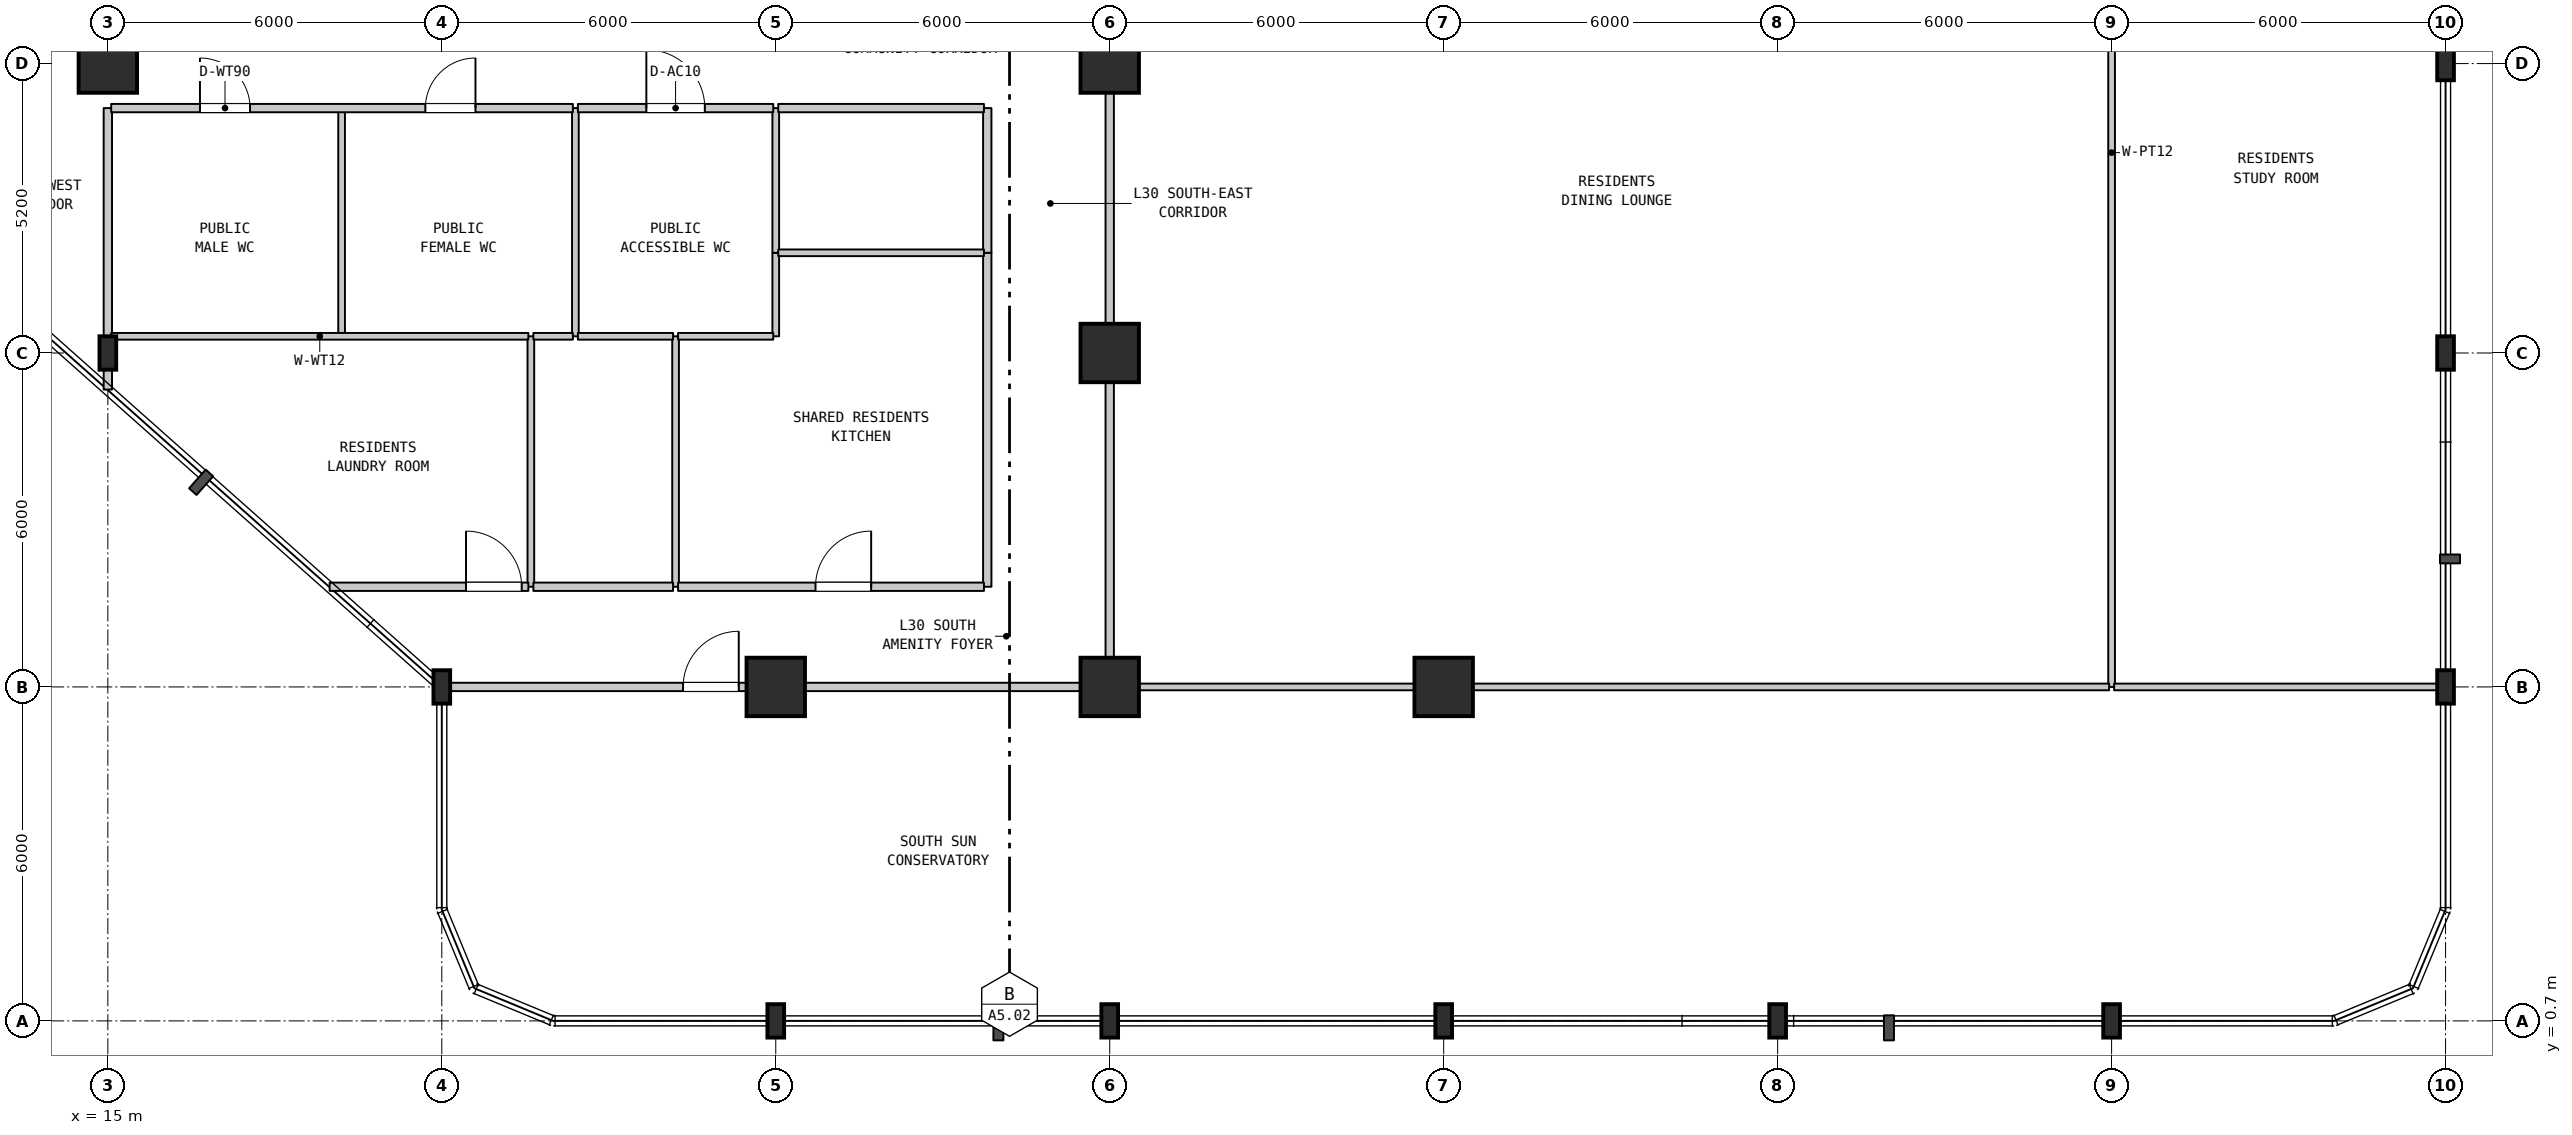
"""IFC4 building model, lengths in metres.
Left out: names, types, materials, properties, quantities, classifications, styles, units other than length and angle.
Written with IfcOpenShell. Run it as: python <this file> out.ifc"""

import sys

from ifc_helpers import new_model, si_unit, direction, frame, frame_2d, origin, origin_2d, place, context, subcontext, project, spatial, rectangle, i_section, extrude, element, fill, save


model = new_model("IFC4")
c1 = context("Model", 3, precision=1e-05, world=origin(), true_north=direction((0.0, 1.0)))
c2 = subcontext(c1, "Body", "Model", "MODEL_VIEW")
j1 = project(units=[si_unit("LENGTHUNIT", "METRE"), si_unit("PLANEANGLEUNIT", "RADIAN")], contexts=[c1])
p1 = place(None, origin())
s1 = spatial("IfcSite", under=j1, at=p1, CompositionType="ELEMENT")
p2 = place(p1, origin())
s2 = spatial("IfcBuilding", under=s1, at=p2, CompositionType="ELEMENT")
p3 = place(p2, frame((0.0, 0.0, 125.3)))
s3 = spatial("IfcBuildingStorey", under=s2, at=p3, CompositionType="ELEMENT", Elevation=125.3)
p4 = place(p3, frame((15.0, 12.7, 0.0), z_axis=(0.0, 0.0, 1.0), x_axis=(1.0, 0.0, 0.0)))
e1 = element("IfcColumn", 1, at=p4, inside=s3, PredefinedType="COLUMN", context=c2, shape_type="SweptSolid", body=[
    extrude(i_section(OverallWidth=0.3, OverallDepth=0.6, WebThickness=0.015, FlangeThickness=0.03, FilletRadius=0.027, at=origin_2d()), origin(), (0.0, 0.0, 1.0), 4.5),
])
p5 = place(p3, frame((15.0, 17.9, 0.0), z_axis=(0.0, 0.0, 1.0), x_axis=(1.0, 0.0, 0.0)))
e2 = element("IfcColumn", 2, at=p5, inside=s3, PredefinedType="COLUMN", context=c2, shape_type="SweptSolid", body=[
    extrude(rectangle(XDim=1.05, YDim=1.05, at=origin_2d()), origin(), (0.0, 0.0, 1.0), 4.5),
])
for number, where, z_axis, x_axis in (
    (3, (21.0, 6.7, 0.0), (0.0, 0.0, 1.0), (1.0, 0.0, 0.0)),
    (4, (27.0, 0.7, 0.0), (0.0, 0.0, 1.0), (1.0, 0.0, 0.0)),
):
    element("IfcColumn", number, at=place(p3, frame(where, z_axis=z_axis, x_axis=x_axis)), inside=s3, PredefinedType="COLUMN", context=c2, shape_type="SweptSolid", body=[
        extrude(i_section(OverallWidth=0.3, OverallDepth=0.6, WebThickness=0.015, FlangeThickness=0.03, FilletRadius=0.027, at=origin_2d()), origin(), (0.0, 0.0, 1.0), 4.5),
    ])
p6 = place(p3, frame((27.0, 6.7, 0.0), z_axis=(0.0, 0.0, 1.0), x_axis=(1.0, 0.0, 0.0)))
e5 = element("IfcColumn", 5, at=p6, inside=s3, PredefinedType="COLUMN", context=c2, shape_type="SweptSolid", body=[
    extrude(rectangle(XDim=1.05, YDim=1.05, at=origin_2d()), origin(), (0.0, 0.0, 1.0), 4.5),
])
p7 = place(p3, frame((33.0, 0.7, 0.0), z_axis=(0.0, 0.0, 1.0), x_axis=(1.0, 0.0, 0.0)))
e6 = element("IfcColumn", 6, at=p7, inside=s3, PredefinedType="COLUMN", context=c2, shape_type="SweptSolid", body=[
    extrude(i_section(OverallWidth=0.3, OverallDepth=0.6, WebThickness=0.015, FlangeThickness=0.03, FilletRadius=0.027, at=origin_2d()), origin(), (0.0, 0.0, 1.0), 4.5),
])
for number, where, z_axis, x_axis in (
    (7, (33.0, 6.7, 0.0), (0.0, 0.0, 1.0), (1.0, 0.0, 0.0)),
    (8, (33.0, 12.7, 0.0), (0.0, 0.0, 1.0), (1.0, 0.0, 0.0)),
    (9, (33.0, 17.9, 0.0), (0.0, 0.0, 1.0), (1.0, 0.0, 0.0)),
):
    element("IfcColumn", number, at=place(p3, frame(where, z_axis=z_axis, x_axis=x_axis)), inside=s3, PredefinedType="COLUMN", context=c2, shape_type="SweptSolid", body=[
        extrude(rectangle(XDim=1.05, YDim=1.05, at=origin_2d()), origin(), (0.0, 0.0, 1.0), 4.5),
    ])
p8 = place(p3, frame((39.0, 0.7, 0.0), z_axis=(0.0, 0.0, 1.0), x_axis=(1.0, 0.0, 0.0)))
e10 = element("IfcColumn", 10, at=p8, inside=s3, PredefinedType="COLUMN", context=c2, shape_type="SweptSolid", body=[
    extrude(i_section(OverallWidth=0.3, OverallDepth=0.6, WebThickness=0.015, FlangeThickness=0.03, FilletRadius=0.027, at=origin_2d()), origin(), (0.0, 0.0, 1.0), 4.5),
])
p9 = place(p3, frame((39.0, 6.7, 0.0), z_axis=(0.0, 0.0, 1.0), x_axis=(1.0, 0.0, 0.0)))
e11 = element("IfcColumn", 11, at=p9, inside=s3, PredefinedType="COLUMN", context=c2, shape_type="SweptSolid", body=[
    extrude(rectangle(XDim=1.05, YDim=1.05, at=origin_2d()), origin(), (0.0, 0.0, 1.0), 4.5),
])
for number, where, z_axis, x_axis in (
    (12, (45.0, 0.7, 0.0), (0.0, 0.0, 1.0), (1.0, 0.0, 0.0)),
    (13, (51.0, 0.7, 0.0), (0.0, 0.0, 1.0), (1.0, 0.0, 0.0)),
    (14, (57.0, 6.7, 0.0), (0.0, 0.0, 1.0), (1.0, 0.0, 0.0)),
    (15, (57.0, 12.7, 0.0), (0.0, 0.0, 1.0), (1.0, 0.0, 0.0)),
    (16, (57.0, 17.9, 0.0), (0.0, 0.0, 1.0), (1.0, 0.0, 0.0)),
):
    element("IfcColumn", number, at=place(p3, frame(where, z_axis=z_axis, x_axis=x_axis)), inside=s3, PredefinedType="COLUMN", context=c2, shape_type="SweptSolid", body=[
        extrude(i_section(OverallWidth=0.3, OverallDepth=0.6, WebThickness=0.015, FlangeThickness=0.03, FilletRadius=0.027, at=origin_2d()), origin(), (0.0, 0.0, 1.0), 4.5),
    ])
p10 = place(p3, frame((15.0, 12.043, 0.0), z_axis=(0.0, 0.0, 1.0), x_axis=(0.0, 1.0, 0.0)))
e17 = element("IfcWall", 17, at=p10, inside=s3, PredefinedType="STANDARD", context=c2, shape_type="SweptSolid", body=[
    extrude(rectangle(XDim=0.957, YDim=0.15, at=frame_2d((0.479, 0.0))), origin(), (0.0, 0.0, 1.0), 4.185),
])
p11 = place(p3, frame((15.0, 13.0, 0.0), z_axis=(0.0, 0.0, 1.0), x_axis=(0.0, 1.0, 0.0)))
e18 = element("IfcWall", 18, at=p11, inside=s3, PredefinedType="STANDARD", context=c2, shape_type="SweptSolid", body=[
    extrude(rectangle(XDim=4.1, YDim=0.15, at=frame_2d((2.05, 0.0))), origin(), (0.0, 0.0, 1.0), 3.735),
])
p12 = place(p3, frame((19.2, 13.0, 0.0), z_axis=(0.0, 0.0, 1.0), x_axis=(0.0, 1.0, 0.0)))
e19 = element("IfcWall", 19, at=p12, inside=s3, PredefinedType="PARTITIONING", context=c2, shape_type="SweptSolid", body=[
    extrude(rectangle(XDim=4.1, YDim=0.12, at=frame_2d((2.05, 0.0))), origin(), (0.0, 0.0, 1.0), 4.185),
])
p13 = place(p3, frame((22.6, 8.5, 0.0), z_axis=(0.0, 0.0, 1.0), x_axis=(0.0, 1.0, 0.0)))
e20 = element("IfcWall", 20, at=p13, inside=s3, PredefinedType="PARTITIONING", context=c2, shape_type="SweptSolid", body=[
    extrude(rectangle(XDim=4.5, YDim=0.12, at=frame_2d((2.25, 0.0))), origin(), (0.0, 0.0, 1.0), 4.185),
])
p14 = place(p3, frame((23.4, 13.0, 0.0), z_axis=(0.0, 0.0, 1.0), x_axis=(0.0, 1.0, 0.0)))
e21 = element("IfcWall", 21, at=p14, inside=s3, PredefinedType="PARTITIONING", context=c2, shape_type="SweptSolid", body=[
    extrude(rectangle(XDim=4.1, YDim=0.12, at=frame_2d((2.05, 0.0))), origin(), (0.0, 0.0, 1.0), 4.185),
])
p15 = place(p3, frame((25.2, 8.5, 0.0), z_axis=(0.0, 0.0, 1.0), x_axis=(0.0, 1.0, 0.0)))
e22 = element("IfcWall", 22, at=p15, inside=s3, PredefinedType="PARTITIONING", context=c2, shape_type="SweptSolid", body=[
    extrude(rectangle(XDim=4.5, YDim=0.12, at=frame_2d((2.25, 0.0))), origin(), (0.0, 0.0, 1.0), 4.185),
])
p16 = place(p3, frame((27.0, 13.0, 0.0), z_axis=(0.0, 0.0, 1.0), x_axis=(0.0, 1.0, 0.0)))
e23 = element("IfcWall", 23, at=p16, inside=s3, PredefinedType="PARTITIONING", context=c2, shape_type="SweptSolid", body=[
    extrude(rectangle(XDim=1.5, YDim=0.12, at=frame_2d((0.75, 0.0))), origin(), (0.0, 0.0, 1.0), 4.185),
])
p17 = place(p3, frame((27.0, 14.5, 0.0), z_axis=(0.0, 0.0, 1.0), x_axis=(0.0, 1.0, 0.0)))
e24 = element("IfcWall", 24, at=p17, inside=s3, PredefinedType="PARTITIONING", context=c2, shape_type="SweptSolid", body=[
    extrude(rectangle(XDim=2.6, YDim=0.12, at=frame_2d((1.3, 0.0))), origin(), (0.0, 0.0, 1.0), 4.185),
])
p18 = place(p3, frame((30.8, 8.5, 0.0), z_axis=(0.0, 0.0, 1.0), x_axis=(0.0, 1.0, 0.0)))
e25 = element("IfcWall", 25, at=p18, inside=s3, PredefinedType="STANDARD", context=c2, shape_type="SweptSolid", body=[
    extrude(rectangle(XDim=6.0, YDim=0.15, at=frame_2d((3.0, 0.0))), origin(), (0.0, 0.0, 1.0), 4.185),
])
p19 = place(p3, frame((30.8, 14.5, 0.0), z_axis=(0.0, 0.0, 1.0), x_axis=(0.0, 1.0, 0.0)))
e26 = element("IfcWall", 26, at=p19, inside=s3, PredefinedType="STANDARD", context=c2, shape_type="SweptSolid", body=[
    extrude(rectangle(XDim=2.6, YDim=0.15, at=frame_2d((1.3, 0.0))), origin(), (0.0, 0.0, 1.0), 4.185),
])
p20 = place(p3, frame((33.0, 6.7, 0.0), z_axis=(0.0, 0.0, 1.0), x_axis=(0.0, 1.0, 0.0)))
e27 = element("IfcWall", 27, at=p20, inside=s3, PredefinedType="STANDARD", context=c2, shape_type="SweptSolid", body=[
    extrude(rectangle(XDim=19.2, YDim=0.15, at=frame_2d((9.6, 0.0))), origin(), (0.0, 0.0, 1.0), 3.735),
])
p21 = place(p3, frame((51.0, 6.7, 0.0), z_axis=(0.0, 0.0, 1.0), x_axis=(0.0, 1.0, 0.0)))
e28 = element("IfcWall", 28, at=p21, inside=s3, PredefinedType="PARTITIONING", context=c2, shape_type="SweptSolid", body=[
    extrude(rectangle(XDim=19.2, YDim=0.12, at=frame_2d((9.6, 0.0))), origin(), (0.0, 0.0, 1.0), 4.185),
])
p22 = place(p3, frame((21.01, 6.7, 0.0), z_axis=(0.0, 0.0, 1.0), x_axis=(1.0, 0.0, 0.0)))
e29 = element("IfcWall", 29, at=p22, inside=s3, PredefinedType="STANDARD", context=c2, shape_type="SweptSolid", body=[
    extrude(rectangle(XDim=11.93, YDim=0.15, at=frame_2d((5.965, 0.0))), origin(), (0.0, 0.0, 1.0), 3.735),
])
p23 = place(p22, frame((4.325, 0.0, 0.0)))
e30 = element("IfcOpeningElement", 30, at=p23, cuts=e29, PredefinedType="OPENING", context=c2, shape_type="SweptSolid", body=[
    extrude(rectangle(XDim=1.0, YDim=2.15, at=frame_2d((0.5, 1.075))), frame((0.0, 0.085, 0.0), z_axis=(0.0, -1.0, 0.0), x_axis=(1.0, 0.0, 0.0)), (0.0, 0.0, 1.0), 0.17),
])
p24 = place(p3, frame((33.06, 6.7, 0.0), z_axis=(0.0, 0.0, 1.0), x_axis=(1.0, 0.0, 0.0)))
e31 = element("IfcWall", 31, at=p24, inside=s3, PredefinedType="PARTITIONING", context=c2, shape_type="SweptSolid", body=[
    extrude(rectangle(XDim=5.94, YDim=0.12, at=frame_2d((2.97, 0.0))), origin(), (0.0, 0.0, 1.0), 3.735),
])
p25 = place(p3, frame((51.045, 6.7, 0.0), z_axis=(0.0, 0.0, 1.0), x_axis=(1.0, 0.0, 0.0)))
e32 = element("IfcWall", 32, at=p25, inside=s3, PredefinedType="PARTITIONING", context=c2, shape_type="SweptSolid", body=[
    extrude(rectangle(XDim=5.945, YDim=0.12, at=frame_2d((2.973, 0.0))), origin(), (0.0, 0.0, 1.0), 3.585),
])
p26 = place(p3, frame((18.985, 8.5, 0.0), z_axis=(0.0, 0.0, 1.0), x_axis=(1.0, 0.0, 0.0)))
e33 = element("IfcWall", 33, at=p26, inside=s3, PredefinedType="STANDARD", context=c2, shape_type="SweptSolid", body=[
    extrude(rectangle(XDim=3.57, YDim=0.15, at=frame_2d((1.785, 0.0))), origin(), (0.0, 0.0, 1.0), 4.185),
])
p27 = place(p26, frame((2.45, 0.0, 0.0)))
e34 = element("IfcOpeningElement", 34, at=p27, cuts=e33, PredefinedType="OPENING", context=c2, shape_type="SweptSolid", body=[
    extrude(rectangle(XDim=1.0, YDim=2.15, at=frame_2d((0.5, 1.075))), frame((0.0, 0.085, 0.0), z_axis=(0.0, -1.0, 0.0), x_axis=(1.0, 0.0, 0.0)), (0.0, 0.0, 1.0), 0.17),
])
p28 = place(p3, frame((22.645, 8.5, 0.0), z_axis=(0.0, 0.0, 1.0), x_axis=(1.0, 0.0, 0.0)))
e35 = element("IfcWall", 35, at=p28, inside=s3, PredefinedType="STANDARD", context=c2, shape_type="SweptSolid", body=[
    extrude(rectangle(XDim=2.51, YDim=0.15, at=frame_2d((1.255, 0.0))), origin(), (0.0, 0.0, 1.0), 4.185),
])
p29 = place(p3, frame((25.245, 8.5, 0.0), z_axis=(0.0, 0.0, 1.0), x_axis=(1.0, 0.0, 0.0)))
e36 = element("IfcWall", 36, at=p29, inside=s3, PredefinedType="STANDARD", context=c2, shape_type="SweptSolid", body=[
    extrude(rectangle(XDim=5.495, YDim=0.15, at=frame_2d((2.748, 0.0))), origin(), (0.0, 0.0, 1.0), 4.185),
])
p30 = place(p29, frame((2.469, 0.0, 0.0)))
e37 = element("IfcOpeningElement", 37, at=p30, cuts=e36, PredefinedType="OPENING", context=c2, shape_type="SweptSolid", body=[
    extrude(rectangle(XDim=1.0, YDim=2.15, at=frame_2d((0.5, 1.075))), frame((0.0, 0.085, 0.0), z_axis=(0.0, -1.0, 0.0), x_axis=(1.0, 0.0, 0.0)), (0.0, 0.0, 1.0), 0.17),
])
p31 = place(p3, frame((15.06, 13.0, 0.0), z_axis=(0.0, 0.0, 1.0), x_axis=(1.0, 0.0, 0.0)))
e38 = element("IfcWall", 38, at=p31, inside=s3, PredefinedType="PARTITIONING", context=c2, shape_type="SweptSolid", body=[
    extrude(rectangle(XDim=7.495, YDim=0.12, at=frame_2d((3.748, 0.0))), origin(), (0.0, 0.0, 1.0), 4.185),
])
p32 = place(p3, frame((22.645, 13.0, 0.0), z_axis=(0.0, 0.0, 1.0), x_axis=(1.0, 0.0, 0.0)))
e39 = element("IfcWall", 39, at=p32, inside=s3, PredefinedType="PARTITIONING", context=c2, shape_type="SweptSolid", body=[
    extrude(rectangle(XDim=0.71, YDim=0.12, at=frame_2d((0.355, 0.0))), origin(), (0.0, 0.0, 1.0), 4.185),
])
for number, where, z_axis, x_axis in (
    (40, (23.445, 13.0, 0.0), (0.0, 0.0, 1.0), (1.0, 0.0, 0.0)),
    (41, (25.245, 13.0, 0.0), (0.0, 0.0, 1.0), (1.0, 0.0, 0.0)),
):
    element("IfcWall", number, at=place(p3, frame(where, z_axis=z_axis, x_axis=x_axis)), inside=s3, PredefinedType="PARTITIONING", context=c2, shape_type="SweptSolid", body=[
        extrude(rectangle(XDim=1.71, YDim=0.12, at=frame_2d((0.855, 0.0))), origin(), (0.0, 0.0, 1.0), 4.185),
    ])
p33 = place(p3, frame((27.045, 14.5, 0.0), z_axis=(0.0, 0.0, 1.0), x_axis=(1.0, 0.0, 0.0)))
e42 = element("IfcWall", 42, at=p33, inside=s3, PredefinedType="PARTITIONING", context=c2, shape_type="SweptSolid", body=[
    extrude(rectangle(XDim=3.695, YDim=0.12, at=frame_2d((1.848, 0.0))), origin(), (0.0, 0.0, 1.0), 4.185),
])
p34 = place(p3, frame((15.06, 17.1, 0.0), z_axis=(0.0, 0.0, 1.0), x_axis=(1.0, 0.0, 0.0)))
e43 = element("IfcWall", 43, at=p34, inside=s3, PredefinedType="STANDARD", context=c2, shape_type="SweptSolid", body=[
    extrude(rectangle(XDim=8.295, YDim=0.15, at=frame_2d((4.147, 0.0))), origin(), (0.0, 0.0, 1.0), 4.185),
])
p35 = place(p34, frame((1.595, 0.0, 0.0)))
e44 = element("IfcOpeningElement", 44, at=p35, cuts=e43, PredefinedType="OPENING", context=c2, shape_type="SweptSolid", body=[
    extrude(rectangle(XDim=0.9, YDim=2.1, at=frame_2d((0.45, 1.05))), frame((0.0, 0.085, 0.0), z_axis=(0.0, -1.0, 0.0), x_axis=(1.0, 0.0, 0.0)), (0.0, 0.0, 1.0), 0.17),
])
p36 = place(p34, frame((5.645, 0.0, 0.0)))
e45 = element("IfcOpeningElement", 45, at=p36, cuts=e43, PredefinedType="OPENING", context=c2, shape_type="SweptSolid", body=[
    extrude(rectangle(XDim=0.9, YDim=2.1, at=frame_2d((0.45, 1.05))), frame((0.0, 0.085, 0.0), z_axis=(0.0, -1.0, 0.0), x_axis=(1.0, 0.0, 0.0)), (0.0, 0.0, 1.0), 0.17),
])
p37 = place(p3, frame((23.445, 17.1, 0.0), z_axis=(0.0, 0.0, 1.0), x_axis=(1.0, 0.0, 0.0)))
e46 = element("IfcWall", 46, at=p37, inside=s3, PredefinedType="STANDARD", context=c2, shape_type="SweptSolid", body=[
    extrude(rectangle(XDim=3.51, YDim=0.15, at=frame_2d((1.755, 0.0))), origin(), (0.0, 0.0, 1.0), 4.185),
])
p38 = place(p37, frame((1.23, 0.0, 0.0)))
e47 = element("IfcOpeningElement", 47, at=p38, cuts=e46, PredefinedType="OPENING", context=c2, shape_type="SweptSolid", body=[
    extrude(rectangle(XDim=1.05, YDim=2.15, at=frame_2d((0.525, 1.075))), frame((0.0, 0.085, 0.0), z_axis=(0.0, -1.0, 0.0), x_axis=(1.0, 0.0, 0.0)), (0.0, 0.0, 1.0), 0.17),
])
p39 = place(p3, frame((27.045, 17.1, 0.0), z_axis=(0.0, 0.0, 1.0), x_axis=(1.0, 0.0, 0.0)))
e48 = element("IfcWall", 48, at=p39, inside=s3, PredefinedType="STANDARD", context=c2, shape_type="SweptSolid", body=[
    extrude(rectangle(XDim=3.695, YDim=0.15, at=frame_2d((1.848, 0.0))), origin(), (0.0, 0.0, 1.0), 4.185),
])
p40 = place(p3, frame((39.0, 6.7, 0.0), z_axis=(0.0, 0.0, 1.0), x_axis=(1.0, 0.0, 0.0)))
e49 = element("IfcWall", 49, at=p40, inside=s3, PredefinedType="PARTITIONING", context=c2, shape_type="SweptSolid", body=[
    extrude(rectangle(XDim=11.955, YDim=0.12, at=frame_2d((5.978, 0.0))), origin(), (0.0, 0.0, 1.0), 3.585),
])
p41 = place(p23, origin())
e50 = element("IfcDoor", 50, at=p41, inside=s3, OperationType="SINGLE_SWING_RIGHT", PredefinedType="DOOR", context=c2, shape_type="SweptSolid", body=[
    extrude(rectangle(XDim=1.0, YDim=2.15, at=frame_2d((0.5, 1.075))), frame((0.0, 0.025, 0.0), z_axis=(0.0, -1.0, 0.0), x_axis=(1.0, 0.0, 0.0)), (0.0, 0.0, 1.0), 0.05),
])
fill(e30, e50)
p42 = place(p27, origin())
e51 = element("IfcDoor", 51, at=p42, inside=s3, OperationType="SINGLE_SWING_LEFT", PredefinedType="DOOR", context=c2, shape_type="SweptSolid", body=[
    extrude(rectangle(XDim=1.0, YDim=2.15, at=frame_2d((0.5, 1.075))), frame((0.0, 0.025, 0.0), z_axis=(0.0, -1.0, 0.0), x_axis=(1.0, 0.0, 0.0)), (0.0, 0.0, 1.0), 0.05),
])
fill(e34, e51)
p43 = place(p30, origin())
e52 = element("IfcDoor", 52, at=p43, inside=s3, OperationType="SINGLE_SWING_RIGHT", PredefinedType="DOOR", context=c2, shape_type="SweptSolid", body=[
    extrude(rectangle(XDim=1.0, YDim=2.15, at=frame_2d((0.5, 1.075))), frame((0.0, 0.025, 0.0), z_axis=(0.0, -1.0, 0.0), x_axis=(1.0, 0.0, 0.0)), (0.0, 0.0, 1.0), 0.05),
])
fill(e37, e52)
p44 = place(p35, origin())
e53 = element("IfcDoor", 53, at=p44, inside=s3, OperationType="SINGLE_SWING_LEFT", PredefinedType="DOOR", context=c2, shape_type="SweptSolid", body=[
    extrude(rectangle(XDim=0.9, YDim=2.1, at=frame_2d((0.45, 1.05))), frame((0.0, 0.025, 0.0), z_axis=(0.0, -1.0, 0.0), x_axis=(1.0, 0.0, 0.0)), (0.0, 0.0, 1.0), 0.05),
])
fill(e44, e53)
p45 = place(p36, origin())
e54 = element("IfcDoor", 54, at=p45, inside=s3, OperationType="SINGLE_SWING_RIGHT", PredefinedType="DOOR", context=c2, shape_type="SweptSolid", body=[
    extrude(rectangle(XDim=0.9, YDim=2.1, at=frame_2d((0.45, 1.05))), frame((0.0, 0.025, 0.0), z_axis=(0.0, -1.0, 0.0), x_axis=(1.0, 0.0, 0.0)), (0.0, 0.0, 1.0), 0.05),
])
fill(e45, e54)
p46 = place(p38, origin())
e55 = element("IfcDoor", 55, at=p46, inside=s3, OperationType="SINGLE_SWING_LEFT", PredefinedType="DOOR", context=c2, shape_type="SweptSolid", body=[
    extrude(rectangle(XDim=1.05, YDim=2.15, at=frame_2d((0.525, 1.075))), frame((0.0, 0.025, 0.0), z_axis=(0.0, -1.0, 0.0), x_axis=(1.0, 0.0, 0.0)), (0.0, 0.0, 1.0), 0.05),
])
fill(e47, e55)
save(model, sys.argv[1])
